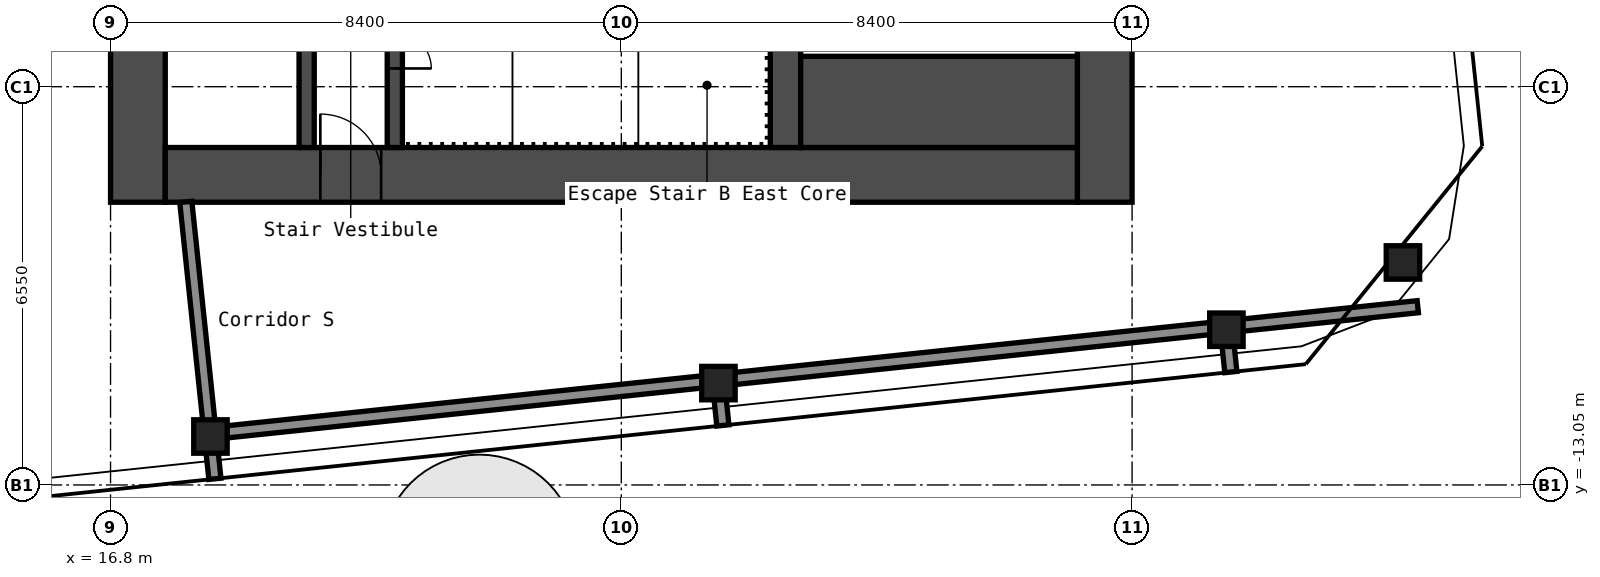
"""IFC4 building model, lengths in metres.
Left out: names, types, materials, properties, quantities, classifications, styles, units other than length and angle.
Written with IfcOpenShell. Run it as: python <this file> out.ifc"""

import sys

from ifc_helpers import new_model, si_unit, direction, frame, frame_2d, origin, origin_2d, place, context, subcontext, project, spatial, rectangle, hollow_rectangle, extrude, element, fill, save


model = new_model("IFC4")
c1 = context("Model", 3, precision=1e-05, world=origin(), true_north=direction((0.0, 1.0)))
c2 = subcontext(c1, "Body", "Model", "MODEL_VIEW")
j1 = project(units=[si_unit("LENGTHUNIT", "METRE"), si_unit("PLANEANGLEUNIT", "RADIAN")], contexts=[c1])
p1 = place(None, origin())
s1 = spatial("IfcSite", under=j1, at=p1, CompositionType="ELEMENT")
p2 = place(p1, origin())
s2 = spatial("IfcBuilding", under=s1, at=p2, CompositionType="ELEMENT")
p3 = place(p2, frame((0.0, 0.0, 251.8)))
s3 = spatial("IfcBuildingStorey", under=s2, at=p3, CompositionType="ELEMENT", Elevation=251.8)
for number, where, z_axis, x_axis in (
    (1, (18.443, -12.253, 0.0), (0.0, 0.0, 1.0), (1.0, 0.0, 0.0)),
    (2, (26.797, -11.375, 0.0), (0.0, 0.0, 1.0), (1.0, 0.0, 0.0)),
    (3, (35.151, -10.497, 0.0), (0.0, 0.0, 1.0), (1.0, 0.0, 0.0)),
    (4, (38.054, -9.39, 0.0), (0.0, 0.0, 1.0), (1.0, 0.0, 0.0)),
):
    element("IfcColumn", number, at=place(p3, frame(where, z_axis=z_axis, x_axis=x_axis)), inside=s3, PredefinedType="COLUMN", context=c2, shape_type="SweptSolid", body=[
        extrude(hollow_rectangle(XDim=0.55, YDim=0.55, WallThickness=0.022, InnerFilletRadius=0.033, OuterFilletRadius=0.055, at=origin_2d()), origin(), (0.0, 0.0, 1.0), 2.75),
    ])
p4 = place(p3, frame((17.25, -8.4, 0.0), z_axis=(0.0, 0.0, 1.0), x_axis=(0.0, 1.0, 0.0)))
e5 = element("IfcWall", 5, at=p4, inside=s3, PredefinedType="SHEAR", context=c2, shape_type="SweptSolid", body=[
    extrude(rectangle(XDim=16.8, YDim=0.9, at=frame_2d((8.4, 0.0))), origin(), (0.0, 0.0, 1.0), 2.75),
])
p5 = place(p4, frame((11.879, 0.0, 0.0)))
e6 = element("IfcOpeningElement", 6, at=p5, cuts=e5, PredefinedType="OPENING", context=c2, shape_type="SweptSolid", body=[
    extrude(rectangle(XDim=1.6, YDim=2.1, at=frame_2d((0.8, 1.05))), frame((0.0, 0.46, 0.0), z_axis=(0.0, -1.0, 0.0), x_axis=(1.0, 0.0, 0.0)), (0.0, 0.0, 1.0), 0.92),
])
p6 = place(p3, frame((33.15, -8.4, 0.0), z_axis=(0.0, 0.0, 1.0), x_axis=(0.0, 1.0, 0.0)))
e7 = element("IfcWall", 7, at=p6, inside=s3, PredefinedType="SHEAR", context=c2, shape_type="SweptSolid", body=[
    extrude(rectangle(XDim=16.8, YDim=0.9, at=frame_2d((8.4, 0.0))), origin(), (0.0, 0.0, 1.0), 2.75),
])
p7 = place(p3, frame((17.7, -7.95, 0.0), z_axis=(0.0, 0.0, 1.0), x_axis=(1.0, 0.0, 0.0)))
e8 = element("IfcWall", 8, at=p7, inside=s3, PredefinedType="SHEAR", context=c2, shape_type="SweptSolid", body=[
    extrude(rectangle(XDim=15.0, YDim=0.9, at=frame_2d((7.5, 0.0))), origin(), (0.0, 0.0, 1.0), 2.75),
])
p8 = place(p7, frame((2.55, 0.0, 0.0)))
e9 = element("IfcOpeningElement", 9, at=p8, cuts=e8, PredefinedType="OPENING", context=c2, shape_type="SweptSolid", body=[
    extrude(rectangle(XDim=1.0, YDim=2.1, at=frame_2d((0.5, 1.05))), frame((0.0, 0.46, 0.0), z_axis=(0.0, -1.0, 0.0), x_axis=(1.0, 0.0, 0.0)), (0.0, 0.0, 1.0), 0.92),
])
p9 = place(p3, frame((20.025, -7.5, 0.0), z_axis=(0.0, 0.0, 1.0), x_axis=(0.0, 1.0, 0.0)))
e10 = element("IfcWall", 10, at=p9, inside=s3, PredefinedType="SHEAR", context=c2, shape_type="SweptSolid", body=[
    extrude(rectangle(XDim=6.3, YDim=0.25, at=frame_2d((3.15, 0.0))), origin(), (0.0, 0.0, 1.0), 2.75),
])
p10 = place(p9, frame((2.4, 0.0, 0.0)))
e11 = element("IfcOpeningElement", 11, at=p10, cuts=e10, PredefinedType="OPENING", context=c2, shape_type="SweptSolid", body=[
    extrude(rectangle(XDim=1.0, YDim=2.1, at=frame_2d((0.5, 1.05))), frame((0.0, 0.135, 0.0), z_axis=(0.0, -1.0, 0.0), x_axis=(1.0, 0.0, 0.0)), (0.0, 0.0, 1.0), 0.27),
])
p11 = place(p3, frame((21.475, -7.5, 0.0), z_axis=(0.0, 0.0, 1.0), x_axis=(0.0, 1.0, 0.0)))
e12 = element("IfcWall", 12, at=p11, inside=s3, PredefinedType="SHEAR", context=c2, shape_type="SweptSolid", body=[
    extrude(rectangle(XDim=3.75, YDim=0.25, at=frame_2d((1.875, 0.0))), origin(), (0.0, 0.0, 1.0), 2.75),
])
p12 = place(p11, frame((1.3, 0.0, 0.0)))
e13 = element("IfcOpeningElement", 13, at=p12, cuts=e12, PredefinedType="OPENING", context=c2, shape_type="SweptSolid", body=[
    extrude(rectangle(XDim=1.2, YDim=2.1, at=frame_2d((0.6, 1.05))), frame((0.0, 0.135, 0.0), z_axis=(0.0, -1.0, 0.0), x_axis=(1.0, 0.0, 0.0)), (0.0, 0.0, 1.0), 0.27),
])
p13 = place(p3, frame((27.9, -7.5, 0.0), z_axis=(0.0, 0.0, 1.0), x_axis=(0.0, 1.0, 0.0)))
e14 = element("IfcWall", 14, at=p13, inside=s3, PredefinedType="SHEAR", context=c2, shape_type="SweptSolid", body=[
    extrude(rectangle(XDim=3.75, YDim=0.5, at=frame_2d((1.875, 0.0))), origin(), (0.0, 0.0, 1.0), 2.75),
])
p14 = place(p3, frame((28.15, -6.75, 0.0), z_axis=(0.0, 0.0, 1.0), x_axis=(1.0, 0.0, 0.0)))
e15 = element("IfcWall", 15, at=p14, inside=s3, PredefinedType="SHEAR", context=c2, shape_type="SweptSolid", body=[
    extrude(rectangle(XDim=4.55, YDim=1.5, at=frame_2d((2.275, 0.0))), origin(), (0.0, 0.0, 1.0), 2.75),
])
p15 = place(p3, frame((18.708, -12.177, 0.0), z_axis=(0.0, 0.0, 1.0), x_axis=(0.994521604238, 0.104531233147, 0.0)))
e16 = element("IfcWall", 16, at=p15, inside=s3, PredefinedType="PARTITIONING", context=c2, shape_type="SweptSolid", body=[
    extrude(rectangle(XDim=19.698, YDim=0.2, at=frame_2d((9.849, 0.0))), origin(), (0.0, 0.0, 1.0), 2.75),
])
p16 = place(p3, frame((18.516, -12.949, 0.0), z_axis=(0.0, 0.0, 1.0), x_axis=(-0.104548796268, 0.994519758074, 0.0)))
e17 = element("IfcWall", 17, at=p16, inside=s3, PredefinedType="PARTITIONING", context=c2, shape_type="SweptSolid", body=[
    extrude(rectangle(XDim=4.579, YDim=0.2, at=frame_2d((2.29, 0.0))), origin(), (0.0, 0.0, 1.0), 2.75),
])
for number, where, z_axis, x_axis in (
    (18, (26.87, -12.071, 0.0), (0.0, 0.0, 1.0), (-0.105, 0.994, 0.0)),
    (19, (35.224, -11.193, 0.0), (0.0, 0.0, 1.0), (-0.105, 0.994, 0.0)),
):
    element("IfcWall", number, at=place(p3, frame(where, z_axis=z_axis, x_axis=x_axis)), inside=s3, PredefinedType="PARTITIONING", context=c2, shape_type="SweptSolid", body=[
        extrude(rectangle(XDim=0.434, YDim=0.2, at=frame_2d((0.217, 0.0))), origin(), (0.0, 0.0, 1.0), 2.75),
    ])
p17 = place(p8, origin())
e20 = element("IfcDoor", 20, at=p17, inside=s3, OperationType="SINGLE_SWING_RIGHT", PredefinedType="DOOR", context=c2, shape_type="SweptSolid", body=[
    extrude(rectangle(XDim=1.0, YDim=2.1, at=frame_2d((0.5, 1.05))), frame((0.0, 0.025, 0.0), z_axis=(0.0, -1.0, 0.0), x_axis=(1.0, 0.0, 0.0)), (0.0, 0.0, 1.0), 0.05),
])
fill(e9, e20)
p18 = place(p12, origin())
e21 = element("IfcDoor", 21, at=p18, inside=s3, OperationType="DOUBLE_DOOR_SINGLE_SWING", PredefinedType="DOOR", context=c2, shape_type="SweptSolid", body=[
    extrude(rectangle(XDim=1.2, YDim=2.1, at=frame_2d((0.6, 1.05))), frame((0.0, 0.025, 0.0), z_axis=(0.0, -1.0, 0.0), x_axis=(1.0, 0.0, 0.0)), (0.0, 0.0, 1.0), 0.05),
])
fill(e13, e21)
save(model, sys.argv[1])
